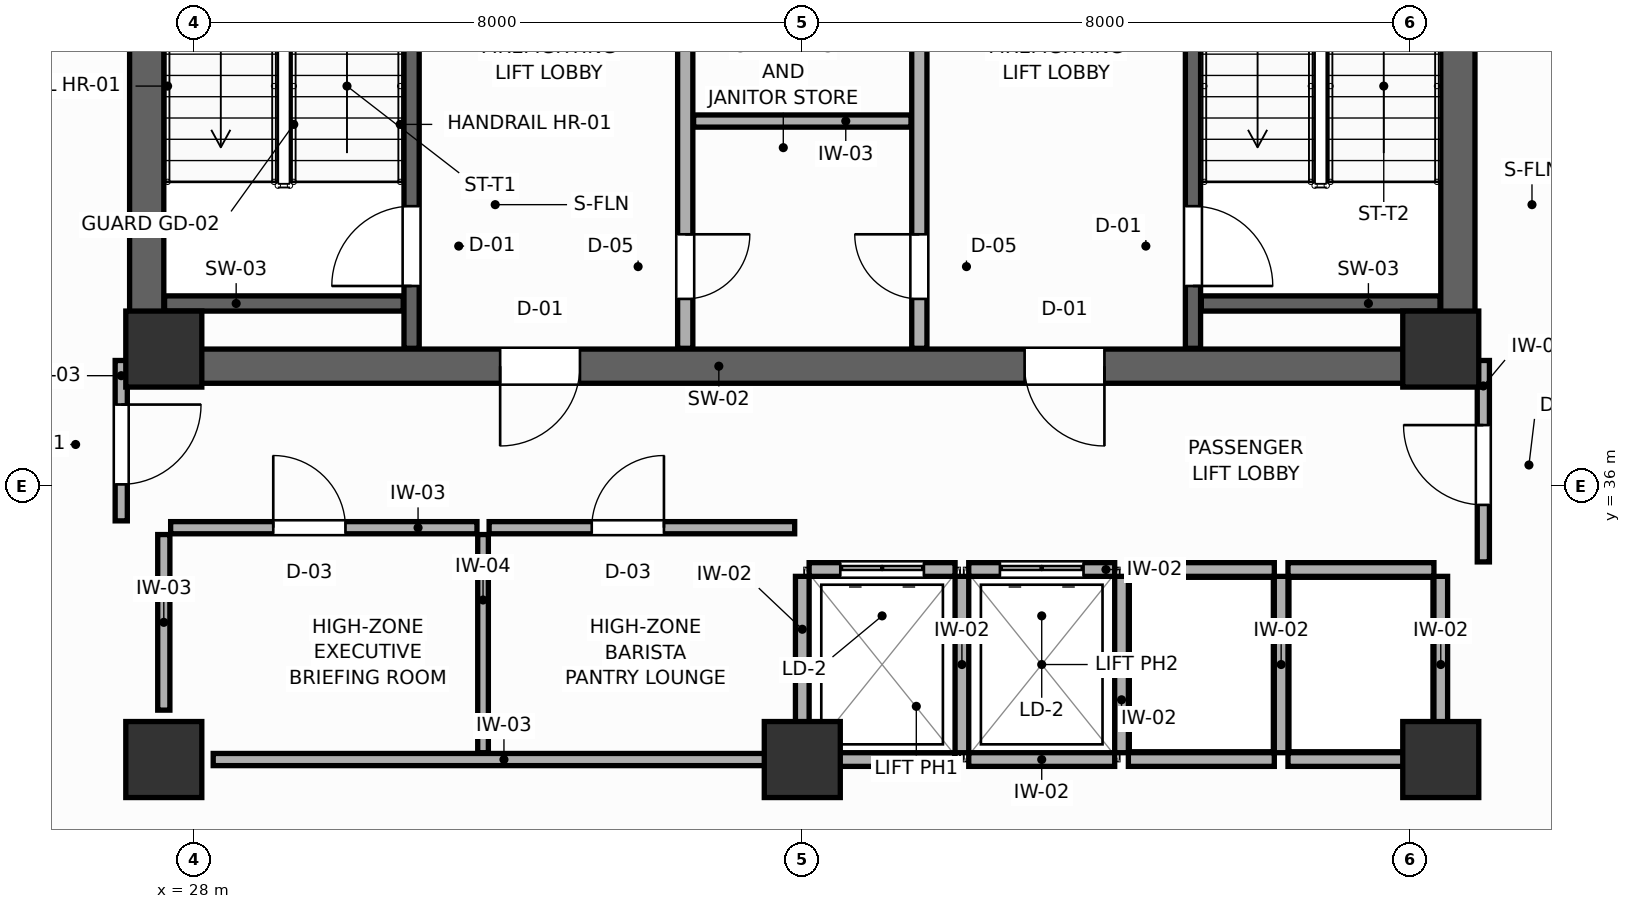
"""IFC4 building model, lengths in metres.
Left out: names, types, materials, properties, quantities, classifications, styles, units other than length and angle.
Written with IfcOpenShell. Run it as: python <this file> out.ifc"""

import sys

from ifc_helpers import new_model, si_unit, direction, frame, frame_2d, origin, origin_2d, place, context, subcontext, project, spatial, rectangle, extrude, source, transform, mapped, element, fill, save


model = new_model("IFC4")
c1 = context("Model", 3, precision=1e-05, world=origin(), true_north=direction((0.0, 1.0)))
c2 = subcontext(c1, "Body", "Model", "MODEL_VIEW")
j1 = project(units=[si_unit("LENGTHUNIT", "METRE"), si_unit("PLANEANGLEUNIT", "RADIAN")], contexts=[c1])
p1 = place(None, origin())
s1 = spatial("IfcSite", under=j1, at=p1, CompositionType="ELEMENT")
p2 = place(p1, origin())
s2 = spatial("IfcBuilding", under=s1, at=p2, CompositionType="ELEMENT")
p3 = place(p2, frame((0.0, 0.0, 183.0)))
s3 = spatial("IfcBuildingStorey", under=s2, at=p3, CompositionType="ELEMENT", Elevation=183.0)
p4 = place(p3, frame((27.15, 37.575, 0.0), z_axis=(0.0, 0.0, 1.0), x_axis=(1.0, 0.0, 0.0)))
e1 = element("IfcWall", 1, at=p4, inside=s3, PredefinedType="SHEAR", context=c2, shape_type="SweptSolid", body=[
    extrude(rectangle(XDim=17.7, YDim=0.45, at=frame_2d((8.85, 0.0))), origin(), (0.0, 0.0, 1.0), 3.6),
])
p5 = place(p4, frame((4.875, 0.0, 0.0)))
e2 = element("IfcOpeningElement", 2, at=p5, cuts=e1, PredefinedType="OPENING", context=c2, shape_type="SweptSolid", body=[
    extrude(rectangle(XDim=1.05, YDim=2.1, at=frame_2d((0.525, 1.05))), frame((0.0, 0.235, 0.0), z_axis=(0.0, -1.0, 0.0), x_axis=(1.0, 0.0, 0.0)), (0.0, 0.0, 1.0), 0.47),
])
p6 = place(p4, frame((11.775, 0.0, 0.0)))
e3 = element("IfcOpeningElement", 3, at=p6, cuts=e1, PredefinedType="OPENING", context=c2, shape_type="SweptSolid", body=[
    extrude(rectangle(XDim=1.05, YDim=2.1, at=frame_2d((0.525, 1.05))), frame((0.0, 0.235, 0.0), z_axis=(0.0, -1.0, 0.0), x_axis=(1.0, 0.0, 0.0)), (0.0, 0.0, 1.0), 0.47),
])
for number, where, z_axis, x_axis in (
    (4, (27.375, 37.8, 0.0), (0.0, 0.0, 1.0), (0.0, 1.0, 0.0)),
    (5, (44.625, 37.8, 0.0), (0.0, 0.0, 1.0), (0.0, 1.0, 0.0)),
):
    element("IfcWall", number, at=place(p3, frame(where, z_axis=z_axis, x_axis=x_axis)), inside=s3, PredefinedType="SHEAR", context=c2, shape_type="SweptSolid", body=[
        extrude(rectangle(XDim=9.0, YDim=0.45, at=frame_2d((4.5, 0.0))), origin(), (0.0, 0.0, 1.0), 3.6),
    ])
m1 = source(origin(), c2, "Body", "SweptSolid", [
    extrude(rectangle(XDim=1.0, YDim=1.0, at=origin_2d()), origin(), (0.0, 0.0, 1.0), 3.6),
])
for number, where, z_axis, x_axis in (
    (6, (27.6, 37.8, 0.0), (0.0, 0.0, 1.0), (1.0, 0.0, 0.0)),
    (7, (44.4, 37.8, 0.0), (0.0, 0.0, 1.0), (1.0, 0.0, 0.0)),
    (8, (27.6, 32.4, 0.0), (0.0, 0.0, 1.0), (1.0, 0.0, 0.0)),
    (9, (44.4, 32.4, 0.0), (0.0, 0.0, 1.0), (1.0, 0.0, 0.0)),
    (10, (36.0, 32.4, 0.0), (0.0, 0.0, 1.0), (1.0, 0.0, 0.0)),
):
    element("IfcColumn", number, at=place(p3, frame(where, z_axis=z_axis, x_axis=x_axis)), inside=s3, PredefinedType="COLUMN", context=c2, shape_type="MappedRepresentation", body=[
        mapped(m1, transform((0.0, 0.0, 0.0), scale=1.0)),
    ])
p7 = place(p3, frame((30.86, 37.81, 0.0), z_axis=(0.0, 0.0, 1.0), x_axis=(0.0, 1.0, 0.0)))
e11 = element("IfcWall", 11, at=p7, inside=s3, PredefinedType="SHEAR", context=c2, shape_type="SweptSolid", body=[
    extrude(rectangle(XDim=8.98, YDim=0.2, at=frame_2d((4.49, 0.0))), origin(), (0.0, 0.0, 1.0), 3.6),
])
p8 = place(p7, frame((0.82, 0.0, 0.0)))
e12 = element("IfcOpeningElement", 12, at=p8, cuts=e11, PredefinedType="OPENING", context=c2, shape_type="SweptSolid", body=[
    extrude(rectangle(XDim=1.05, YDim=2.1, at=frame_2d((0.525, 1.05))), frame((0.0, 0.11, 0.0), z_axis=(0.0, -1.0, 0.0), x_axis=(1.0, 0.0, 0.0)), (0.0, 0.0, 1.0), 0.22),
])
p9 = place(p3, frame((27.61, 38.4, 0.0), z_axis=(0.0, 0.0, 1.0), x_axis=(1.0, 0.0, 0.0)))
e13 = element("IfcWall", 13, at=p9, inside=s3, PredefinedType="SHEAR", context=c2, shape_type="SweptSolid", body=[
    extrude(rectangle(XDim=3.14, YDim=0.2, at=frame_2d((1.57, 0.0))), origin(), (0.0, 0.0, 1.0), 3.6),
])
p10 = place(p3, frame((41.14, 37.81, 0.0), z_axis=(0.0, 0.0, 1.0), x_axis=(0.0, 1.0, 0.0)))
e14 = element("IfcWall", 14, at=p10, inside=s3, PredefinedType="SHEAR", context=c2, shape_type="SweptSolid", body=[
    extrude(rectangle(XDim=8.98, YDim=0.2, at=frame_2d((4.49, 0.0))), origin(), (0.0, 0.0, 1.0), 3.6),
])
p11 = place(p10, frame((0.82, 0.0, 0.0)))
e15 = element("IfcOpeningElement", 15, at=p11, cuts=e14, PredefinedType="OPENING", context=c2, shape_type="SweptSolid", body=[
    extrude(rectangle(XDim=1.05, YDim=2.1, at=frame_2d((0.525, 1.05))), frame((0.0, 0.11, 0.0), z_axis=(0.0, -1.0, 0.0), x_axis=(1.0, 0.0, 0.0)), (0.0, 0.0, 1.0), 0.22),
])
p12 = place(p3, frame((41.25, 38.4, 0.0), z_axis=(0.0, 0.0, 1.0), x_axis=(1.0, 0.0, 0.0)))
e16 = element("IfcWall", 16, at=p12, inside=s3, PredefinedType="SHEAR", context=c2, shape_type="SweptSolid", body=[
    extrude(rectangle(XDim=3.14, YDim=0.2, at=frame_2d((1.57, 0.0))), origin(), (0.0, 0.0, 1.0), 3.6),
])
p13 = place(p3, frame((34.46, 37.81, 0.0), z_axis=(0.0, 0.0, 1.0), x_axis=(0.0, 1.0, 0.0)))
e17 = element("IfcWall", 17, at=p13, inside=s3, PredefinedType="PARTITIONING", context=c2, shape_type="SweptSolid", body=[
    extrude(rectangle(XDim=8.98, YDim=0.2, at=frame_2d((4.49, 0.0))), origin(), (0.0, 0.0, 1.0), 3.4),
])
p14 = place(p13, frame((0.65, 0.0, 0.0)))
e18 = element("IfcOpeningElement", 18, at=p14, cuts=e17, PredefinedType="OPENING", context=c2, shape_type="SweptSolid", body=[
    extrude(rectangle(XDim=0.85, YDim=2.05, at=frame_2d((0.425, 1.025))), frame((0.0, 0.11, 0.0), z_axis=(0.0, -1.0, 0.0), x_axis=(1.0, 0.0, 0.0)), (0.0, 0.0, 1.0), 0.22),
])
p15 = place(p3, frame((37.54, 37.81, 0.0), z_axis=(0.0, 0.0, 1.0), x_axis=(0.0, 1.0, 0.0)))
e19 = element("IfcWall", 19, at=p15, inside=s3, PredefinedType="PARTITIONING", context=c2, shape_type="SweptSolid", body=[
    extrude(rectangle(XDim=8.98, YDim=0.2, at=frame_2d((4.49, 0.0))), origin(), (0.0, 0.0, 1.0), 3.4),
])
p16 = place(p15, frame((0.65, 0.0, 0.0)))
e20 = element("IfcOpeningElement", 20, at=p16, cuts=e19, PredefinedType="OPENING", context=c2, shape_type="SweptSolid", body=[
    extrude(rectangle(XDim=0.85, YDim=2.05, at=frame_2d((0.425, 1.025))), frame((0.0, 0.11, 0.0), z_axis=(0.0, -1.0, 0.0), x_axis=(1.0, 0.0, 0.0)), (0.0, 0.0, 1.0), 0.22),
])
p17 = place(p3, frame((34.57, 40.8, 0.0), z_axis=(0.0, 0.0, 1.0), x_axis=(1.0, 0.0, 0.0)))
e21 = element("IfcWall", 21, at=p17, inside=s3, PredefinedType="PARTITIONING", context=c2, shape_type="SweptSolid", body=[
    extrude(rectangle(XDim=2.86, YDim=0.16, at=frame_2d((1.43, 0.0))), origin(), (0.0, 0.0, 1.0), 3.4),
])
p18 = place(p3, frame((36.09, 34.9, 0.0), z_axis=(0.0, 0.0, 1.0), x_axis=(1.0, 0.0, 0.0)))
e22 = element("IfcWall", 22, at=p18, inside=s3, PredefinedType="PARTITIONING", context=c2, shape_type="SweptSolid", body=[
    extrude(rectangle(XDim=1.92, YDim=0.18, at=frame_2d((0.96, 0.0))), origin(), (0.0, 0.0, 1.0), 3.4),
])
p19 = place(p18, frame((0.41, 0.0, 0.0)))
e23 = element("IfcOpeningElement", 23, at=p19, cuts=e22, PredefinedType="OPENING", context=c2, shape_type="SweptSolid", body=[
    extrude(rectangle(XDim=1.1, YDim=2.1, at=frame_2d((0.55, 1.05))), frame((0.0, 0.1, 0.0), z_axis=(0.0, -1.0, 0.0), x_axis=(1.0, 0.0, 0.0)), (0.0, 0.0, 1.0), 0.2),
])
p20 = place(p3, frame((36.09, 32.4, 0.0), z_axis=(0.0, 0.0, 1.0), x_axis=(1.0, 0.0, 0.0)))
e24 = element("IfcWall", 24, at=p20, inside=s3, PredefinedType="PARTITIONING", context=c2, shape_type="SweptSolid", body=[
    extrude(rectangle(XDim=1.92, YDim=0.18, at=frame_2d((0.96, 0.0))), origin(), (0.0, 0.0, 1.0), 2.16),
])
p21 = place(p3, frame((36.0, 32.49, 0.0), z_axis=(0.0, 0.0, 1.0), x_axis=(0.0, 1.0, 0.0)))
e25 = element("IfcWall", 25, at=p21, inside=s3, PredefinedType="PARTITIONING", context=c2, shape_type="SweptSolid", body=[
    extrude(rectangle(XDim=2.32, YDim=0.18, at=frame_2d((1.16, 0.0))), origin(), (0.0, 0.0, 1.0), 3.4),
])
p22 = place(p3, frame((38.19, 34.9, 0.0), z_axis=(0.0, 0.0, 1.0), x_axis=(1.0, 0.0, 0.0)))
e26 = element("IfcWall", 26, at=p22, inside=s3, PredefinedType="PARTITIONING", context=c2, shape_type="SweptSolid", body=[
    extrude(rectangle(XDim=1.92, YDim=0.18, at=frame_2d((0.96, 0.0))), origin(), (0.0, 0.0, 1.0), 3.4),
])
p23 = place(p22, frame((0.41, 0.0, 0.0)))
e27 = element("IfcOpeningElement", 27, at=p23, cuts=e26, PredefinedType="OPENING", context=c2, shape_type="SweptSolid", body=[
    extrude(rectangle(XDim=1.1, YDim=2.1, at=frame_2d((0.55, 1.05))), frame((0.0, 0.1, 0.0), z_axis=(0.0, -1.0, 0.0), x_axis=(1.0, 0.0, 0.0)), (0.0, 0.0, 1.0), 0.2),
])
p24 = place(p3, frame((38.19, 32.4, 0.0), z_axis=(0.0, 0.0, 1.0), x_axis=(1.0, 0.0, 0.0)))
e28 = element("IfcWall", 28, at=p24, inside=s3, PredefinedType="PARTITIONING", context=c2, shape_type="SweptSolid", body=[
    extrude(rectangle(XDim=1.92, YDim=0.18, at=frame_2d((0.96, 0.0))), origin(), (0.0, 0.0, 1.0), 2.16),
])
p25 = place(p3, frame((38.1, 32.49, 0.0), z_axis=(0.0, 0.0, 1.0), x_axis=(0.0, 1.0, 0.0)))
e29 = element("IfcWall", 29, at=p25, inside=s3, PredefinedType="PARTITIONING", context=c2, shape_type="SweptSolid", body=[
    extrude(rectangle(XDim=2.32, YDim=0.18, at=frame_2d((1.16, 0.0))), origin(), (0.0, 0.0, 1.0), 3.4),
])
p26 = place(p3, frame((40.29, 34.9, 0.0), z_axis=(0.0, 0.0, 1.0), x_axis=(1.0, 0.0, 0.0)))
e30 = element("IfcWall", 30, at=p26, inside=s3, PredefinedType="PARTITIONING", context=c2, shape_type="SweptSolid", body=[
    extrude(rectangle(XDim=1.92, YDim=0.18, at=frame_2d((0.96, 0.0))), origin(), (0.0, 0.0, 1.0), 3.4),
])
p27 = place(p3, frame((40.29, 32.4, 0.0), z_axis=(0.0, 0.0, 1.0), x_axis=(1.0, 0.0, 0.0)))
e31 = element("IfcWall", 31, at=p27, inside=s3, PredefinedType="PARTITIONING", context=c2, shape_type="SweptSolid", body=[
    extrude(rectangle(XDim=1.92, YDim=0.18, at=frame_2d((0.96, 0.0))), origin(), (0.0, 0.0, 1.0), 2.16),
])
p28 = place(p3, frame((40.2, 32.49, 0.0), z_axis=(0.0, 0.0, 1.0), x_axis=(0.0, 1.0, 0.0)))
e32 = element("IfcWall", 32, at=p28, inside=s3, PredefinedType="PARTITIONING", context=c2, shape_type="SweptSolid", body=[
    extrude(rectangle(XDim=2.32, YDim=0.18, at=frame_2d((1.16, 0.0))), origin(), (0.0, 0.0, 1.0), 3.4),
])
p29 = place(p3, frame((42.39, 34.9, 0.0), z_axis=(0.0, 0.0, 1.0), x_axis=(1.0, 0.0, 0.0)))
e33 = element("IfcWall", 33, at=p29, inside=s3, PredefinedType="PARTITIONING", context=c2, shape_type="SweptSolid", body=[
    extrude(rectangle(XDim=1.92, YDim=0.18, at=frame_2d((0.96, 0.0))), origin(), (0.0, 0.0, 1.0), 3.4),
])
p30 = place(p3, frame((42.39, 32.4, 0.0), z_axis=(0.0, 0.0, 1.0), x_axis=(1.0, 0.0, 0.0)))
e34 = element("IfcWall", 34, at=p30, inside=s3, PredefinedType="PARTITIONING", context=c2, shape_type="SweptSolid", body=[
    extrude(rectangle(XDim=1.92, YDim=0.18, at=frame_2d((0.96, 0.0))), origin(), (0.0, 0.0, 1.0), 2.16),
])
for number, where, z_axis, x_axis in (
    (35, (42.3, 32.49, 0.0), (0.0, 0.0, 1.0), (0.0, 1.0, 0.0)),
    (36, (44.4, 32.49, 0.0), (0.0, 0.0, 1.0), (0.0, 1.0, 0.0)),
):
    element("IfcWall", number, at=place(p3, frame(where, z_axis=z_axis, x_axis=x_axis)), inside=s3, PredefinedType="PARTITIONING", context=c2, shape_type="SweptSolid", body=[
        extrude(rectangle(XDim=2.32, YDim=0.18, at=frame_2d((1.16, 0.0))), origin(), (0.0, 0.0, 1.0), 3.4),
    ])
p31 = place(p3, frame((28.25, 32.4, 0.0), z_axis=(0.0, 0.0, 1.0), x_axis=(1.0, 0.0, 0.0)))
e37 = element("IfcWall", 37, at=p31, inside=s3, PredefinedType="PARTITIONING", context=c2, shape_type="SweptSolid", body=[
    extrude(rectangle(XDim=7.65, YDim=0.16, at=frame_2d((3.825, 0.0))), origin(), (0.0, 0.0, 1.0), 2.16),
])
p32 = place(p3, frame((27.6, 33.05, 0.0), z_axis=(0.0, 0.0, 1.0), x_axis=(0.0, 1.0, 0.0)))
e38 = element("IfcWall", 38, at=p32, inside=s3, PredefinedType="PARTITIONING", context=c2, shape_type="SweptSolid", body=[
    extrude(rectangle(XDim=2.31, YDim=0.16, at=frame_2d((1.155, 0.0))), origin(), (0.0, 0.0, 1.0), 3.4),
])
p33 = place(p3, frame((31.8, 32.49, 0.0), z_axis=(0.0, 0.0, 1.0), x_axis=(0.0, 1.0, 0.0)))
e39 = element("IfcWall", 39, at=p33, inside=s3, PredefinedType="PARTITIONING", context=c2, shape_type="SweptSolid", body=[
    extrude(rectangle(XDim=2.87, YDim=0.14, at=frame_2d((1.435, 0.0))), origin(), (0.0, 0.0, 1.0), 3.4),
])
p34 = place(p3, frame((27.69, 35.45, 0.0), z_axis=(0.0, 0.0, 1.0), x_axis=(1.0, 0.0, 0.0)))
e40 = element("IfcWall", 40, at=p34, inside=s3, PredefinedType="PARTITIONING", context=c2, shape_type="SweptSolid", body=[
    extrude(rectangle(XDim=4.03, YDim=0.16, at=frame_2d((2.015, 0.0))), origin(), (0.0, 0.0, 1.0), 3.4),
])
p35 = place(p34, frame((1.35, 0.0, 0.0)))
e41 = element("IfcOpeningElement", 41, at=p35, cuts=e40, PredefinedType="OPENING", context=c2, shape_type="SweptSolid", body=[
    extrude(rectangle(XDim=0.95, YDim=2.05, at=frame_2d((0.475, 1.025))), frame((0.0, 0.09, 0.0), z_axis=(0.0, -1.0, 0.0), x_axis=(1.0, 0.0, 0.0)), (0.0, 0.0, 1.0), 0.18),
])
p36 = place(p3, frame((31.88, 35.45, 0.0), z_axis=(0.0, 0.0, 1.0), x_axis=(1.0, 0.0, 0.0)))
e42 = element("IfcWall", 42, at=p36, inside=s3, PredefinedType="PARTITIONING", context=c2, shape_type="SweptSolid", body=[
    extrude(rectangle(XDim=4.02, YDim=0.16, at=frame_2d((2.01, 0.0))), origin(), (0.0, 0.0, 1.0), 3.4),
])
p37 = place(p36, frame((1.35, 0.0, 0.0)))
e43 = element("IfcOpeningElement", 43, at=p37, cuts=e42, PredefinedType="OPENING", context=c2, shape_type="SweptSolid", body=[
    extrude(rectangle(XDim=0.95, YDim=2.05, at=frame_2d((0.475, 1.025))), frame((0.0, 0.09, 0.0), z_axis=(0.0, -1.0, 0.0), x_axis=(1.0, 0.0, 0.0)), (0.0, 0.0, 1.0), 0.18),
])
p38 = place(p3, frame((27.04, 35.54, 0.0), z_axis=(0.0, 0.0, 1.0), x_axis=(0.0, 1.0, 0.0)))
e44 = element("IfcWall", 44, at=p38, inside=s3, PredefinedType="PARTITIONING", context=c2, shape_type="SweptSolid", body=[
    extrude(rectangle(XDim=2.11, YDim=0.16, at=frame_2d((1.055, 0.0))), origin(), (0.0, 0.0, 1.0), 3.4),
])
p39 = place(p38, frame((0.48, 0.0, 0.0)))
e45 = element("IfcOpeningElement", 45, at=p39, cuts=e44, PredefinedType="OPENING", context=c2, shape_type="SweptSolid", body=[
    extrude(rectangle(XDim=1.05, YDim=2.1, at=frame_2d((0.525, 1.05))), frame((0.0, 0.09, 0.0), z_axis=(0.0, -1.0, 0.0), x_axis=(1.0, 0.0, 0.0)), (0.0, 0.0, 1.0), 0.18),
])
p40 = place(p3, frame((44.96, 35.0, 0.0), z_axis=(0.0, 0.0, 1.0), x_axis=(0.0, 1.0, 0.0)))
e46 = element("IfcWall", 46, at=p40, inside=s3, PredefinedType="PARTITIONING", context=c2, shape_type="SweptSolid", body=[
    extrude(rectangle(XDim=2.65, YDim=0.16, at=frame_2d((1.325, 0.0))), origin(), (0.0, 0.0, 1.0), 3.4),
])
p41 = place(p40, frame((0.75, 0.0, 0.0)))
e47 = element("IfcOpeningElement", 47, at=p41, cuts=e46, PredefinedType="OPENING", context=c2, shape_type="SweptSolid", body=[
    extrude(rectangle(XDim=1.05, YDim=2.1, at=frame_2d((0.525, 1.05))), frame((0.0, 0.09, 0.0), z_axis=(0.0, -1.0, 0.0), x_axis=(1.0, 0.0, 0.0)), (0.0, 0.0, 1.0), 0.18),
])
p42 = place(p8, origin())
e48 = element("IfcDoor", 48, at=p42, inside=s3, OperationType="SINGLE_SWING_LEFT", PredefinedType="DOOR", context=c2, shape_type="SweptSolid", body=[
    extrude(rectangle(XDim=1.05, YDim=2.1, at=frame_2d((0.525, 1.05))), frame((0.0, 0.025, 0.0), z_axis=(0.0, -1.0, 0.0), x_axis=(1.0, 0.0, 0.0)), (0.0, 0.0, 1.0), 0.05),
])
fill(e12, e48)
p43 = place(p11, frame((1.05, 0.0, 0.0), z_axis=(0.0, 0.0, 1.0), x_axis=(-1.0, 0.0, 0.0)))
e49 = element("IfcDoor", 49, at=p43, inside=s3, OperationType="SINGLE_SWING_RIGHT", PredefinedType="DOOR", context=c2, shape_type="SweptSolid", body=[
    extrude(rectangle(XDim=1.05, YDim=2.1, at=frame_2d((0.525, 1.05))), frame((0.0, 0.025, 0.0), z_axis=(0.0, -1.0, 0.0), x_axis=(1.0, 0.0, 0.0)), (0.0, 0.0, 1.0), 0.05),
])
fill(e15, e49)
p44 = place(p14, frame((0.85, 0.0, 0.0), z_axis=(0.0, 0.0, 1.0), x_axis=(-1.0, 0.0, 0.0)))
e50 = element("IfcDoor", 50, at=p44, inside=s3, OperationType="SINGLE_SWING_LEFT", PredefinedType="DOOR", context=c2, shape_type="SweptSolid", body=[
    extrude(rectangle(XDim=0.85, YDim=2.05, at=frame_2d((0.425, 1.025))), frame((0.0, 0.025, 0.0), z_axis=(0.0, -1.0, 0.0), x_axis=(1.0, 0.0, 0.0)), (0.0, 0.0, 1.0), 0.05),
])
fill(e18, e50)
p45 = place(p16, origin())
e51 = element("IfcDoor", 51, at=p45, inside=s3, OperationType="SINGLE_SWING_RIGHT", PredefinedType="DOOR", context=c2, shape_type="SweptSolid", body=[
    extrude(rectangle(XDim=0.85, YDim=2.05, at=frame_2d((0.425, 1.025))), frame((0.0, 0.025, 0.0), z_axis=(0.0, -1.0, 0.0), x_axis=(1.0, 0.0, 0.0)), (0.0, 0.0, 1.0), 0.05),
])
fill(e20, e51)
p46 = place(p19, origin())
e52 = element("IfcDoor", 52, at=p46, inside=s3, OperationType="DOUBLE_DOOR_SLIDING", PredefinedType="DOOR", context=c2, shape_type="SweptSolid", body=[
    extrude(rectangle(XDim=1.1, YDim=2.1, at=frame_2d((0.55, 1.05))), frame((0.0, 0.025, 0.0), z_axis=(0.0, -1.0, 0.0), x_axis=(1.0, 0.0, 0.0)), (0.0, 0.0, 1.0), 0.05),
])
fill(e23, e52)
p47 = place(p23, origin())
e53 = element("IfcDoor", 53, at=p47, inside=s3, OperationType="DOUBLE_DOOR_SLIDING", PredefinedType="DOOR", context=c2, shape_type="SweptSolid", body=[
    extrude(rectangle(XDim=1.1, YDim=2.1, at=frame_2d((0.55, 1.05))), frame((0.0, 0.025, 0.0), z_axis=(0.0, -1.0, 0.0), x_axis=(1.0, 0.0, 0.0)), (0.0, 0.0, 1.0), 0.05),
])
fill(e27, e53)
p48 = place(p35, origin())
e54 = element("IfcDoor", 54, at=p48, inside=s3, OperationType="SINGLE_SWING_LEFT", PredefinedType="DOOR", context=c2, shape_type="SweptSolid", body=[
    extrude(rectangle(XDim=0.95, YDim=2.05, at=frame_2d((0.475, 1.025))), frame((0.0, 0.025, 0.0), z_axis=(0.0, -1.0, 0.0), x_axis=(1.0, 0.0, 0.0)), (0.0, 0.0, 1.0), 0.05),
])
fill(e41, e54)
p49 = place(p37, origin())
e55 = element("IfcDoor", 55, at=p49, inside=s3, OperationType="SINGLE_SWING_RIGHT", PredefinedType="DOOR", context=c2, shape_type="SweptSolid", body=[
    extrude(rectangle(XDim=0.95, YDim=2.05, at=frame_2d((0.475, 1.025))), frame((0.0, 0.025, 0.0), z_axis=(0.0, -1.0, 0.0), x_axis=(1.0, 0.0, 0.0)), (0.0, 0.0, 1.0), 0.05),
])
fill(e43, e55)
p50 = place(p39, frame((1.05, 0.0, 0.0), z_axis=(0.0, 0.0, 1.0), x_axis=(-1.0, 0.0, 0.0)))
e56 = element("IfcDoor", 56, at=p50, inside=s3, OperationType="SINGLE_SWING_LEFT", PredefinedType="DOOR", context=c2, shape_type="SweptSolid", body=[
    extrude(rectangle(XDim=1.05, YDim=2.1, at=frame_2d((0.525, 1.05))), frame((0.0, 0.025, 0.0), z_axis=(0.0, -1.0, 0.0), x_axis=(1.0, 0.0, 0.0)), (0.0, 0.0, 1.0), 0.05),
])
fill(e45, e56)
p51 = place(p41, origin())
e57 = element("IfcDoor", 57, at=p51, inside=s3, OperationType="SINGLE_SWING_RIGHT", PredefinedType="DOOR", context=c2, shape_type="SweptSolid", body=[
    extrude(rectangle(XDim=1.05, YDim=2.1, at=frame_2d((0.525, 1.05))), frame((0.0, 0.025, 0.0), z_axis=(0.0, -1.0, 0.0), x_axis=(1.0, 0.0, 0.0)), (0.0, 0.0, 1.0), 0.05),
])
fill(e47, e57)
p52 = place(p5, frame((1.05, 0.0, 0.0), z_axis=(0.0, 0.0, 1.0), x_axis=(-1.0, 0.0, 0.0)))
e58 = element("IfcDoor", 58, at=p52, inside=s3, OperationType="SINGLE_SWING_RIGHT", PredefinedType="DOOR", context=c2, shape_type="SweptSolid", body=[
    extrude(rectangle(XDim=1.05, YDim=2.1, at=frame_2d((0.525, 1.05))), frame((0.0, 0.025, 0.0), z_axis=(0.0, -1.0, 0.0), x_axis=(1.0, 0.0, 0.0)), (0.0, 0.0, 1.0), 0.05),
])
fill(e2, e58)
p53 = place(p6, frame((1.05, 0.0, 0.0), z_axis=(0.0, 0.0, 1.0), x_axis=(-1.0, 0.0, 0.0)))
e59 = element("IfcDoor", 59, at=p53, inside=s3, OperationType="SINGLE_SWING_LEFT", PredefinedType="DOOR", context=c2, shape_type="SweptSolid", body=[
    extrude(rectangle(XDim=1.05, YDim=2.1, at=frame_2d((0.525, 1.05))), frame((0.0, 0.025, 0.0), z_axis=(0.0, -1.0, 0.0), x_axis=(1.0, 0.0, 0.0)), (0.0, 0.0, 1.0), 0.05),
])
fill(e3, e59)
save(model, sys.argv[1])
